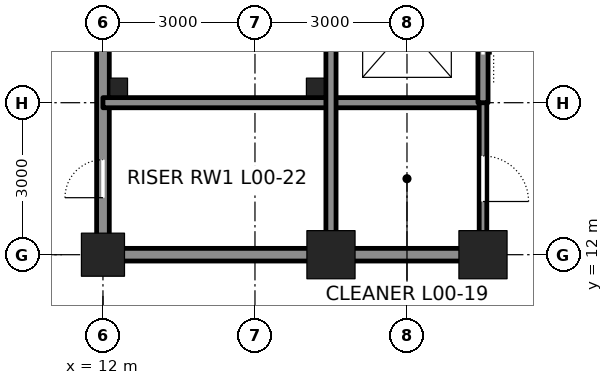
"""IFC4 building model, lengths in metres.
Left out: names, types, materials, properties, quantities, classifications, styles, units other than length and angle.
Written with IfcOpenShell. Run it as: python <this file> out.ifc"""

import sys

from ifc_helpers import new_model, si_unit, direction, frame, frame_2d, origin, origin_2d, place, context, subcontext, project, spatial, rectangle, hollow_rectangle, extrude, element, fill, save


model = new_model("IFC4")
c1 = context("Model", 3, precision=1e-05, world=origin(), true_north=direction((0.0, 1.0)))
c2 = subcontext(c1, "Body", "Model", "MODEL_VIEW")
j1 = project(units=[si_unit("LENGTHUNIT", "METRE"), si_unit("PLANEANGLEUNIT", "RADIAN")], contexts=[c1])
p1 = place(None, origin())
s1 = spatial("IfcSite", under=j1, at=p1, CompositionType="ELEMENT")
p2 = place(p1, origin())
s2 = spatial("IfcBuilding", under=s1, at=p2, CompositionType="ELEMENT")
p3 = place(p2, origin())
s3 = spatial("IfcBuildingStorey", under=s2, at=p3, CompositionType="ELEMENT", Elevation=0.0)
p4 = place(p3, frame((12.0, 12.0, 0.0), z_axis=(0.0, 0.0, 1.0), x_axis=(1.0, 0.0, 0.0)))
e1 = element("IfcColumn", 1, at=p4, inside=s3, PredefinedType="COLUMN", context=c2, shape_type="SweptSolid", body=[
    extrude(hollow_rectangle(XDim=0.85, YDim=0.85, WallThickness=0.085, at=origin_2d()), origin(), (0.0, 0.0, 1.0), 6.0),
])
for number, where, z_axis, x_axis in (
    (2, (16.5, 12.0, 0.0), (0.0, 0.0, 1.0), (1.0, 0.0, 0.0)),
    (3, (19.5, 12.0, 0.0), (0.0, 0.0, 1.0), (1.0, 0.0, 0.0)),
):
    element("IfcColumn", number, at=place(p3, frame(where, z_axis=z_axis, x_axis=x_axis)), inside=s3, PredefinedType="COLUMN", context=c2, shape_type="SweptSolid", body=[
        extrude(hollow_rectangle(XDim=0.95, YDim=0.95, WallThickness=0.095, at=origin_2d()), origin(), (0.0, 0.0, 1.0), 6.0),
    ])
p5 = place(p3, frame((12.0, 12.25, 0.0), z_axis=(0.0, 0.0, 1.0), x_axis=(0.0, 1.0, 0.0)))
e4 = element("IfcWall", 4, at=p5, inside=s3, PredefinedType="SOLIDWALL", context=c2, shape_type="SweptSolid", body=[
    extrude(rectangle(XDim=8.5, YDim=0.25, at=frame_2d((4.25, 0.0))), origin(), (0.0, 0.0, 1.0), 4.873),
])
p6 = place(p5, frame((0.875, 0.0, 0.0)))
e5 = element("IfcOpeningElement", 5, at=p6, cuts=e4, PredefinedType="OPENING", context=c2, shape_type="SweptSolid", body=[
    extrude(rectangle(XDim=0.75, YDim=2.1, at=frame_2d((0.375, 1.05))), frame((0.0, 0.135, 0.0), z_axis=(0.0, -1.0, 0.0), x_axis=(1.0, 0.0, 0.0)), (0.0, 0.0, 1.0), 0.27),
])
p7 = place(p3, frame((12.25, 12.0, 0.0), z_axis=(0.0, 0.0, 1.0), x_axis=(1.0, 0.0, 0.0)))
e6 = element("IfcWall", 6, at=p7, inside=s3, PredefinedType="SOLIDWALL", context=c2, shape_type="SweptSolid", body=[
    extrude(rectangle(XDim=4.0, YDim=0.25, at=frame_2d((2.0, 0.0))), origin(), (0.0, 0.0, 1.0), 4.941),
])
p8 = place(p3, frame((16.75, 12.0, 0.0), z_axis=(0.0, 0.0, 1.0), x_axis=(1.0, 0.0, 0.0)))
e7 = element("IfcWall", 7, at=p8, inside=s3, PredefinedType="SOLIDWALL", context=c2, shape_type="SweptSolid", body=[
    extrude(rectangle(XDim=2.5, YDim=0.25, at=frame_2d((1.25, 0.0))), origin(), (0.0, 0.0, 1.0), 4.941),
])
p9 = place(p3, frame((12.0, 15.0, 0.0), z_axis=(0.0, 0.0, 1.0), x_axis=(1.0, 0.0, 0.0)))
e8 = element("IfcWall", 8, at=p9, inside=s3, PredefinedType="SOLIDWALL", context=c2, shape_type="SweptSolid", body=[
    extrude(rectangle(XDim=7.5, YDim=0.2, at=frame_2d((3.75, 0.0))), origin(), (0.0, 0.0, 1.0), 5.8),
])
p10 = place(p3, frame((16.5, 12.25, 0.0), z_axis=(0.0, 0.0, 1.0), x_axis=(0.0, 1.0, 0.0)))
e9 = element("IfcWall", 9, at=p10, inside=s3, PredefinedType="SOLIDWALL", context=c2, shape_type="SweptSolid", body=[
    extrude(rectangle(XDim=8.5, YDim=0.2, at=frame_2d((4.25, 0.0))), origin(), (0.0, 0.0, 1.0), 4.873),
])
p11 = place(p3, frame((19.5, 12.25, 0.0), z_axis=(0.0, 0.0, 1.0), x_axis=(0.0, 1.0, 0.0)))
e10 = element("IfcWall", 10, at=p11, inside=s3, PredefinedType="PARTITIONING", context=c2, shape_type="SweptSolid", body=[
    extrude(rectangle(XDim=2.75, YDim=0.15, at=frame_2d((1.375, 0.0))), origin(), (0.0, 0.0, 1.0), 4.825),
])
p12 = place(p11, frame((0.8, 0.0, 0.0)))
e11 = element("IfcOpeningElement", 11, at=p12, cuts=e10, PredefinedType="OPENING", context=c2, shape_type="SweptSolid", body=[
    extrude(rectangle(XDim=0.9, YDim=2.1, at=frame_2d((0.45, 1.05))), frame((0.0, 0.085, 0.0), z_axis=(0.0, -1.0, 0.0), x_axis=(1.0, 0.0, 0.0)), (0.0, 0.0, 1.0), 0.17),
])
p13 = place(p3, frame((19.5, 15.0, 0.0), z_axis=(0.0, 0.0, 1.0), x_axis=(0.0, 1.0, 0.0)))
e12 = element("IfcWall", 12, at=p13, inside=s3, PredefinedType="SOLIDWALL", context=c2, shape_type="SweptSolid", body=[
    extrude(rectangle(XDim=12.0, YDim=0.2, at=frame_2d((6.0, 0.0))), origin(), (0.0, 0.0, 1.0), 4.825),
])
p14 = place(p13, frame((0.95, 0.0, 0.0)))
e13 = element("IfcOpeningElement", 13, at=p14, cuts=e12, PredefinedType="OPENING", context=c2, shape_type="SweptSolid", body=[
    extrude(rectangle(XDim=1.1, YDim=2.1, at=frame_2d((0.55, 1.05))), frame((0.0, 0.11, 0.0), z_axis=(0.0, -1.0, 0.0), x_axis=(1.0, 0.0, 0.0)), (0.0, 0.0, 1.0), 0.22),
])
p15 = place(p13, frame((3.95, 0.0, 0.0)))
e14 = element("IfcOpeningElement", 14, at=p15, cuts=e12, PredefinedType="OPENING", context=c2, shape_type="SweptSolid", body=[
    extrude(rectangle(XDim=1.1, YDim=2.1, at=frame_2d((0.55, 1.05))), frame((0.0, 0.11, 0.0), z_axis=(0.0, -1.0, 0.0), x_axis=(1.0, 0.0, 0.0)), (0.0, 0.0, 1.0), 0.22),
])
p16 = place(p13, frame((6.95, 0.0, 0.0)))
e15 = element("IfcOpeningElement", 15, at=p16, cuts=e12, PredefinedType="OPENING", context=c2, shape_type="SweptSolid", body=[
    extrude(rectangle(XDim=1.1, YDim=2.1, at=frame_2d((0.55, 1.05))), frame((0.0, 0.11, 0.0), z_axis=(0.0, -1.0, 0.0), x_axis=(1.0, 0.0, 0.0)), (0.0, 0.0, 1.0), 0.22),
])
p17 = place(p13, frame((9.95, 0.0, 0.0)))
e16 = element("IfcOpeningElement", 16, at=p17, cuts=e12, PredefinedType="OPENING", context=c2, shape_type="SweptSolid", body=[
    extrude(rectangle(XDim=1.1, YDim=2.1, at=frame_2d((0.55, 1.05))), frame((0.0, 0.11, 0.0), z_axis=(0.0, -1.0, 0.0), x_axis=(1.0, 0.0, 0.0)), (0.0, 0.0, 1.0), 0.22),
])
for number, where, z_axis, x_axis in (
    (17, (12.31, 15.31, 0.0), (0.0, 0.0, 1.0), (1.0, 0.0, 0.0)),
    (18, (16.19, 15.31, 0.0), (0.0, 0.0, 1.0), (1.0, 0.0, 0.0)),
):
    element("IfcColumn", number, at=place(p3, frame(where, z_axis=z_axis, x_axis=x_axis)), inside=s3, PredefinedType="COLUMN", context=c2, shape_type="SweptSolid", body=[
        extrude(hollow_rectangle(XDim=0.35, YDim=0.35, WallThickness=0.035, at=origin_2d()), origin(), (0.0, 0.0, 1.0), 6.0),
    ])
p18 = place(p6, origin())
e19 = element("IfcDoor", 19, at=p18, inside=s3, OperationType="SINGLE_SWING_LEFT", PredefinedType="DOOR", context=c2, shape_type="SweptSolid", body=[
    extrude(rectangle(XDim=0.75, YDim=2.1, at=frame_2d((0.375, 1.05))), frame((0.0, 0.025, 0.0), z_axis=(0.0, -1.0, 0.0), x_axis=(1.0, 0.0, 0.0)), (0.0, 0.0, 1.0), 0.05),
])
fill(e5, e19)
p19 = place(p12, frame((0.9, 0.0, 0.0), z_axis=(0.0, 0.0, 1.0), x_axis=(-1.0, 0.0, 0.0)))
e20 = element("IfcDoor", 20, at=p19, inside=s3, OperationType="SINGLE_SWING_RIGHT", PredefinedType="DOOR", context=c2, shape_type="SweptSolid", body=[
    extrude(rectangle(XDim=0.9, YDim=2.1, at=frame_2d((0.45, 1.05))), frame((0.0, 0.025, 0.0), z_axis=(0.0, -1.0, 0.0), x_axis=(1.0, 0.0, 0.0)), (0.0, 0.0, 1.0), 0.05),
])
fill(e11, e20)
p20 = place(p14, origin())
e21 = element("IfcDoor", 21, at=p20, inside=s3, OperationType="DOUBLE_DOOR_SLIDING", PredefinedType="DOOR", context=c2, shape_type="SweptSolid", body=[
    extrude(rectangle(XDim=1.1, YDim=2.1, at=frame_2d((0.55, 1.05))), frame((0.0, 0.025, 0.0), z_axis=(0.0, -1.0, 0.0), x_axis=(1.0, 0.0, 0.0)), (0.0, 0.0, 1.0), 0.05),
])
fill(e13, e21)
save(model, sys.argv[1])
